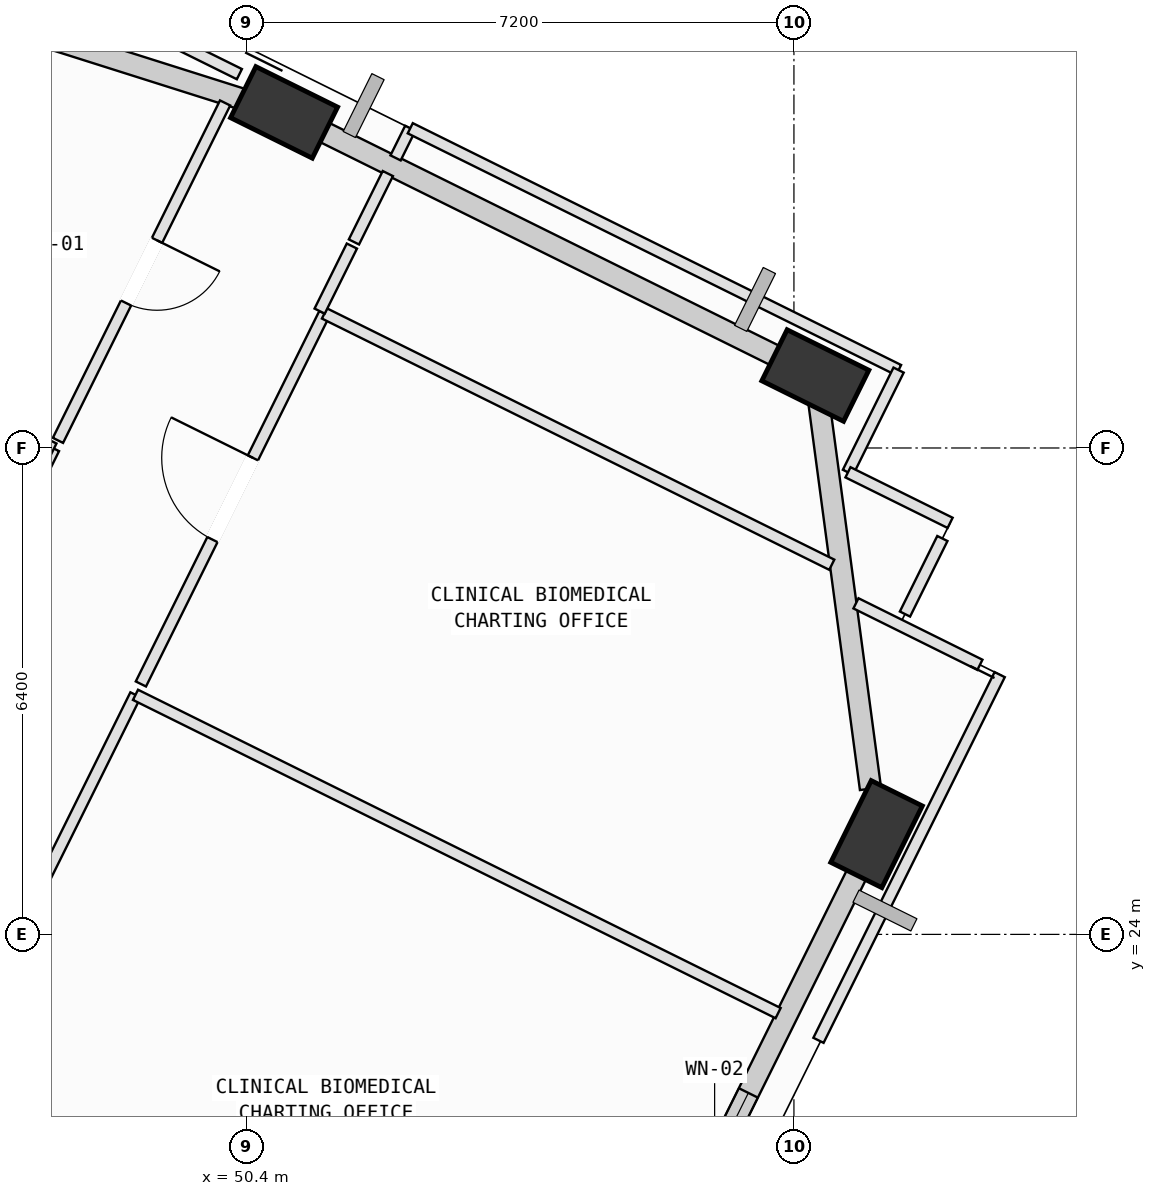
"""IFC4 building model, lengths in metres.
Left out: names, types, materials, properties, quantities, classifications, styles, units other than length and angle.
Written with IfcOpenShell. Run it as: python <this file> out.ifc"""

import sys

from ifc_helpers import new_model, si_unit, direction, frame, frame_2d, origin, origin_2d, place, context, subcontext, project, spatial, rectangle, extrude, element, fill, save


model = new_model("IFC4")
c1 = context("Model", 3, precision=1e-05, world=origin(), true_north=direction((0.0, 1.0)))
c2 = subcontext(c1, "Body", "Model", "MODEL_VIEW")
j1 = project(units=[si_unit("LENGTHUNIT", "METRE"), si_unit("PLANEANGLEUNIT", "RADIAN")], contexts=[c1])
p1 = place(None, origin())
s1 = spatial("IfcSite", under=j1, at=p1, CompositionType="ELEMENT")
p2 = place(p1, origin())
s2 = spatial("IfcBuilding", under=s1, at=p2, CompositionType="ELEMENT")
p3 = place(p2, frame((0.0, 0.0, 296.6)))
s3 = spatial("IfcBuildingStorey", under=s2, at=p3, CompositionType="ELEMENT", Elevation=296.6)
p4 = place(p3, frame((58.687, 25.319, 0.002), z_axis=(-0.003038161274, 0.103419009772, 0.994633237929), x_axis=(-0.417489626034, -0.903939479428, 0.092713697397)))
e1 = element("IfcColumn", 1, at=p4, inside=s3, PredefinedType="COLUMN", context=c2, shape_type="SweptSolid", body=[
    extrude(rectangle(XDim=1.2, YDim=0.75, at=origin_2d()), origin(), (0.0, 0.0, 1.0), 4.018),
])
p5 = place(p3, frame((57.882, 31.354, 0.002), z_axis=(-0.027828879342, 0.099892309253, 0.994609008619), x_axis=(0.981701438256, -0.184780676822, 0.04602594486)))
e2 = element("IfcColumn", 2, at=p5, inside=s3, PredefinedType="COLUMN", context=c2, shape_type="SweptSolid", body=[
    extrude(rectangle(XDim=1.2, YDim=0.75, at=origin_2d()), origin(), (0.0, 0.0, 1.0), 4.018),
])
p6 = place(p3, frame((50.892, 34.816, 0.002), z_axis=(-0.042009013687, 0.071050027497, 0.996587746444), x_axis=(0.996486966579, 0.075309705799, 0.036635688208)))
e3 = element("IfcColumn", 3, at=p6, inside=s3, PredefinedType="COLUMN", context=c2, shape_type="SweptSolid", body=[
    extrude(rectangle(XDim=1.2, YDim=0.75, at=origin_2d()), origin(), (0.0, 0.0, 1.0), 4.01),
])
p7 = place(p3, frame((58.597, 25.138, 0.0), z_axis=(0.0, 0.0, 1.0), x_axis=(-0.443863136941, -0.896094590802, 0.0)))
e4 = element("IfcWall", 4, at=p7, inside=s3, PredefinedType="SOLIDWALL", context=c2, shape_type="SweptSolid", body=[
    extrude(rectangle(XDim=6.418, YDim=0.28, at=frame_2d((3.209, 0.0))), origin(), (0.0, 0.0, 1.0), 3.265),
])
p8 = place(p7, frame((3.598, 0.0, 0.75)))
e5 = element("IfcOpeningElement", 5, at=p8, cuts=e4, PredefinedType="OPENING", context=c2, shape_type="SweptSolid", body=[
    extrude(rectangle(XDim=2.0, YDim=1.95, at=frame_2d((1.0, 0.975))), frame((0.0, 0.15, 0.0), z_axis=(0.0, -1.0, 0.0), x_axis=(1.0, 0.0, 0.0)), (0.0, 0.0, 1.0), 0.3),
])
p9 = place(p3, frame((57.907, 31.165, 0.0), z_axis=(0.0, 0.0, 1.0), x_axis=(0.132260381597, -0.991215007685, 0.0)))
e6 = element("IfcWall", 6, at=p9, inside=s3, PredefinedType="SOLIDWALL", context=c2, shape_type="SweptSolid", body=[
    extrude(rectangle(XDim=5.294, YDim=0.28, at=frame_2d((2.647, 0.0))), origin(), (0.0, 0.0, 1.0), 3.265),
])
p10 = place(p3, frame((51.115, 34.705, 0.0), z_axis=(0.0, 0.0, 1.0), x_axis=(0.896090969188, -0.443870448373, 0.0)))
e7 = element("IfcWall", 7, at=p10, inside=s3, PredefinedType="SOLIDWALL", context=c2, shape_type="SweptSolid", body=[
    extrude(rectangle(XDim=7.046, YDim=0.28, at=frame_2d((3.523, 0.0))), origin(), (0.0, 0.0, 1.0), 3.265),
])
p11 = place(p3, frame((41.795, 37.694, 0.0), z_axis=(0.0, 0.0, 1.0), x_axis=(0.953408556874, -0.301682156712, 0.0)))
e8 = element("IfcWall", 8, at=p11, inside=s3, PredefinedType="SOLIDWALL", context=c2, shape_type="SweptSolid", body=[
    extrude(rectangle(XDim=9.036, YDim=0.28, at=frame_2d((4.518, 0.0))), origin(), (0.0, 0.0, 1.0), 3.265),
])
p12 = place(p3, frame((45.28, 19.768, 0.0), z_axis=(0.0, 0.0, 1.0), x_axis=(0.443808981741, 0.896121413496, 0.0)))
e9 = element("IfcWall", 9, at=p12, inside=s3, PredefinedType="PARTITIONING", context=c2, shape_type="SweptSolid", body=[
    extrude(rectangle(XDim=8.24, YDim=0.15, at=frame_2d((4.12, 0.0))), origin(), (0.0, 0.0, 1.0), 3.415),
])
p13 = place(p12, frame((3.52, 0.0, 0.0)))
e10 = element("IfcOpeningElement", 10, at=p13, cuts=e9, PredefinedType="OPENING", context=c2, shape_type="SweptSolid", body=[
    extrude(rectangle(XDim=1.2, YDim=2.15, at=frame_2d((0.6, 1.075))), frame((0.0, 0.085, 0.0), z_axis=(0.0, -1.0, 0.0), x_axis=(1.0, 0.0, 0.0)), (0.0, 0.0, 1.0), 0.17),
])
p14 = place(p3, frame((48.937, 27.152, 0.0), z_axis=(0.0, 0.0, 1.0), x_axis=(0.896097594631, -0.4438570726, 0.0)))
e11 = element("IfcWall", 11, at=p14, inside=s3, PredefinedType="PARTITIONING", context=c2, shape_type="SweptSolid", body=[
    extrude(rectangle(XDim=9.436, YDim=0.15, at=frame_2d((4.718, 0.0))), origin(), (0.0, 0.0, 1.0), 3.78),
])
p15 = place(p3, frame((49.008, 27.295, 0.0), z_axis=(0.0, 0.0, 1.0), x_axis=(0.443907715055, 0.896072508514, 0.0)))
e12 = element("IfcWall", 12, at=p15, inside=s3, PredefinedType="PARTITIONING", context=c2, shape_type="SweptSolid", body=[
    extrude(rectangle(XDim=5.44, YDim=0.15, at=frame_2d((2.72, 0.0))), origin(), (0.0, 0.0, 1.0), 3.78),
])
p16 = place(p15, frame((2.12, 0.0, 0.0)))
e13 = element("IfcOpeningElement", 13, at=p16, cuts=e12, PredefinedType="OPENING", context=c2, shape_type="SweptSolid", body=[
    extrude(rectangle(XDim=1.2, YDim=2.15, at=frame_2d((0.6, 1.075))), frame((0.0, 0.085, 0.0), z_axis=(0.0, -1.0, 0.0), x_axis=(1.0, 0.0, 0.0)), (0.0, 0.0, 1.0), 0.17),
])
p17 = place(p3, frame((51.423, 32.17, 0.0), z_axis=(0.0, 0.0, 1.0), x_axis=(0.896112067151, -0.44382785301, 0.0)))
e14 = element("IfcWall", 14, at=p17, inside=s3, PredefinedType="PARTITIONING", context=c2, shape_type="SweptSolid", body=[
    extrude(rectangle(XDim=7.449, YDim=0.15, at=frame_2d((3.724, 0.0))), origin(), (0.0, 0.0, 1.0), 3.78),
])
p18 = place(p3, frame((58.416, 28.356, 0.0), z_axis=(0.0, 0.0, 1.0), x_axis=(0.895897385058, -0.444261044259, 0.0)))
e15 = element("IfcWall", 15, at=p18, inside=s3, PredefinedType="PARTITIONING", context=c2, shape_type="SweptSolid", body=[
    extrude(rectangle(XDim=1.821, YDim=0.15, at=frame_2d((0.91, 0.0))), origin(), (0.0, 0.0, 1.0), 3.78),
])
p19 = place(p3, frame((47.864, 30.392, 0.0), z_axis=(0.0, 0.0, 1.0), x_axis=(-0.443876084137, -0.896088177543, 0.0)))
e16 = element("IfcWall", 16, at=p19, inside=s3, PredefinedType="PARTITIONING", context=c2, shape_type="SweptSolid", body=[
    extrude(rectangle(XDim=7.439, YDim=0.15, at=frame_2d((3.719, 0.0))), origin(), (0.0, 0.0, 1.0), 3.78),
])
p20 = place(p19, frame((3.119, 0.0, 0.0)))
e17 = element("IfcOpeningElement", 17, at=p20, cuts=e16, PredefinedType="OPENING", context=c2, shape_type="SweptSolid", body=[
    extrude(rectangle(XDim=1.2, YDim=2.15, at=frame_2d((0.6, 1.075))), frame((0.0, 0.085, 0.0), z_axis=(0.0, -1.0, 0.0), x_axis=(1.0, 0.0, 0.0)), (0.0, 0.0, 1.0), 0.17),
])
p21 = place(p3, frame((39.947, 34.314, 0.0), z_axis=(0.0, 0.0, 1.0), x_axis=(0.896079017082, -0.443894576613, 0.0)))
e18 = element("IfcWall", 18, at=p21, inside=s3, PredefinedType="PARTITIONING", context=c2, shape_type="SweptSolid", body=[
    extrude(rectangle(XDim=8.835, YDim=0.15, at=frame_2d((4.417, 0.0))), origin(), (0.0, 0.0, 1.0), 3.78),
])
p22 = place(p3, frame((43.136, 38.869, 0.0), z_axis=(0.0, 0.0, 1.0), x_axis=(0.896129897891, -0.443791849977, 0.0)))
e19 = element("IfcWall", 19, at=p22, inside=s3, PredefinedType="PARTITIONING", context=c2, shape_type="SweptSolid", body=[
    extrude(rectangle(XDim=7.999, YDim=0.15, at=frame_2d((4.0, 0.0))), origin(), (0.0, 0.0, 1.0), 3.265),
])
p23 = place(p3, frame((50.116, 34.94, 0.0), z_axis=(0.0, 0.0, 1.0), x_axis=(-0.443820260553, -0.896115827515, 0.0)))
e20 = element("IfcWall", 20, at=p23, inside=s3, PredefinedType="PARTITIONING", context=c2, shape_type="SweptSolid", body=[
    extrude(rectangle(XDim=4.955, YDim=0.15, at=frame_2d((2.477, 0.0))), origin(), (0.0, 0.0, 1.0), 3.78),
])
p24 = place(p23, frame((2.017, 0.0, 0.0)))
e21 = element("IfcOpeningElement", 21, at=p24, cuts=e20, PredefinedType="OPENING", context=c2, shape_type="SweptSolid", body=[
    extrude(rectangle(XDim=0.92, YDim=2.1, at=frame_2d((0.46, 1.05))), frame((0.0, 0.085, 0.0), z_axis=(0.0, -1.0, 0.0), x_axis=(1.0, 0.0, 0.0)), (0.0, 0.0, 1.0), 0.17),
])
p25 = place(p3, frame((60.307, 27.418, 0.0), z_axis=(0.0, 0.0, 1.0), x_axis=(-0.443900826603, -0.896075920969, 0.0)))
e22 = element("IfcWall", 22, at=p25, inside=s3, PredefinedType="PARTITIONING", context=c2, shape_type="SweptSolid", body=[
    extrude(rectangle(XDim=5.37, YDim=0.15, at=frame_2d((2.685, 0.0))), origin(), (0.0, 0.0, 1.0), 3.78),
])
p26 = place(p3, frame((51.36, 32.201, 0.0), z_axis=(0.0, 0.0, 1.0), x_axis=(0.443733960968, 0.896158564029, 0.0)))
e23 = element("IfcWall", 23, at=p26, inside=s3, PredefinedType="PARTITIONING", context=c2, shape_type="SweptSolid", body=[
    extrude(rectangle(XDim=0.955, YDim=0.15, at=frame_2d((0.478, 0.0))), origin(), (0.0, 0.0, 1.0), 3.78),
])
p27 = place(p3, frame((59.553, 29.209, 0.0), z_axis=(0.0, 0.0, 1.0), x_axis=(-0.443599514285, -0.896225122905, 0.0)))
e24 = element("IfcWall", 24, at=p27, inside=s3, PredefinedType="PARTITIONING", context=c2, shape_type="SweptSolid", body=[
    extrude(rectangle(XDim=1.109, YDim=0.15, at=frame_2d((0.554, 0.0))), origin(), (0.0, 0.0, 1.0), 3.78),
])
p28 = place(p3, frame((51.811, 33.111, 0.0), z_axis=(0.0, 0.0, 1.0), x_axis=(0.444099519206, 0.895977464583, 0.0)))
e25 = element("IfcWall", 25, at=p28, inside=s3, PredefinedType="PARTITIONING", context=c2, shape_type="SweptSolid", body=[
    extrude(rectangle(XDim=1.004, YDim=0.15, at=frame_2d((0.502, 0.0))), origin(), (0.0, 0.0, 1.0), 3.78),
])
p29 = place(p3, frame((52.359, 34.217, 0.0), z_axis=(0.0, 0.0, 1.0), x_axis=(0.443843724004, 0.896104206364, 0.0)))
e26 = element("IfcWall", 26, at=p29, inside=s3, PredefinedType="PARTITIONING", context=c2, shape_type="SweptSolid", body=[
    extrude(rectangle(XDim=0.435, YDim=0.15, at=frame_2d((0.218, 0.0))), origin(), (0.0, 0.0, 1.0), 3.78),
])
p30 = place(p3, frame((52.552, 34.607, 0.0), z_axis=(0.0, 0.0, 1.0), x_axis=(0.896130036263, -0.443791570567, 0.0)))
e27 = element("IfcWall", 27, at=p30, inside=s3, PredefinedType="PARTITIONING", context=c2, shape_type="SweptSolid", body=[
    extrude(rectangle(XDim=7.17, YDim=0.15, at=frame_2d((3.585, 0.0))), origin(), (0.0, 0.0, 1.0), 3.265),
])
p31 = place(p3, frame((58.977, 31.425, 0.0), z_axis=(0.0, 0.0, 1.0), x_axis=(-0.443761683498, -0.896144836653, 0.0)))
e28 = element("IfcWall", 28, at=p31, inside=s3, PredefinedType="PARTITIONING", context=c2, shape_type="SweptSolid", body=[
    extrude(rectangle(XDim=1.501, YDim=0.15, at=frame_2d((0.75, 0.0))), origin(), (0.0, 0.0, 1.0), 3.78),
])
p32 = place(p3, frame((58.311, 30.08, 0.0), z_axis=(0.0, 0.0, 1.0), x_axis=(0.896275535339, -0.443497649094, 0.0)))
e29 = element("IfcWall", 29, at=p32, inside=s3, PredefinedType="PARTITIONING", context=c2, shape_type="SweptSolid", body=[
    extrude(rectangle(XDim=1.5, YDim=0.15, at=frame_2d((0.75, 0.0))), origin(), (0.0, 0.0, 1.0), 3.78),
])
p33 = place(p8, origin())
e30 = element("IfcWindow", 30, at=p33, inside=s3, PartitioningType="SINGLE_PANEL", PredefinedType="WINDOW", context=c2, shape_type="SweptSolid", body=[
    extrude(rectangle(XDim=2.0, YDim=1.95, at=frame_2d((1.0, 0.975))), frame((0.0, 0.03, 0.0), z_axis=(0.0, -1.0, 0.0), x_axis=(1.0, 0.0, 0.0)), (0.0, 0.0, 1.0), 0.06),
])
fill(e5, e30)
p34 = place(p16, origin())
e31 = element("IfcDoor", 31, at=p34, inside=s3, OperationType="SINGLE_SWING_RIGHT", PredefinedType="DOOR", context=c2, shape_type="SweptSolid", body=[
    extrude(rectangle(XDim=1.2, YDim=2.15, at=frame_2d((0.6, 1.075))), frame((0.0, 0.025, 0.0), z_axis=(0.0, -1.0, 0.0), x_axis=(1.0, 0.0, 0.0)), (0.0, 0.0, 1.0), 0.05),
])
fill(e13, e31)
p35 = place(p24, origin())
e32 = element("IfcDoor", 32, at=p35, inside=s3, OperationType="SINGLE_SWING_LEFT", PredefinedType="DOOR", context=c2, shape_type="SweptSolid", body=[
    extrude(rectangle(XDim=0.92, YDim=2.1, at=frame_2d((0.46, 1.05))), frame((0.0, 0.025, 0.0), z_axis=(0.0, -1.0, 0.0), x_axis=(1.0, 0.0, 0.0)), (0.0, 0.0, 1.0), 0.05),
])
fill(e21, e32)
save(model, sys.argv[1])
